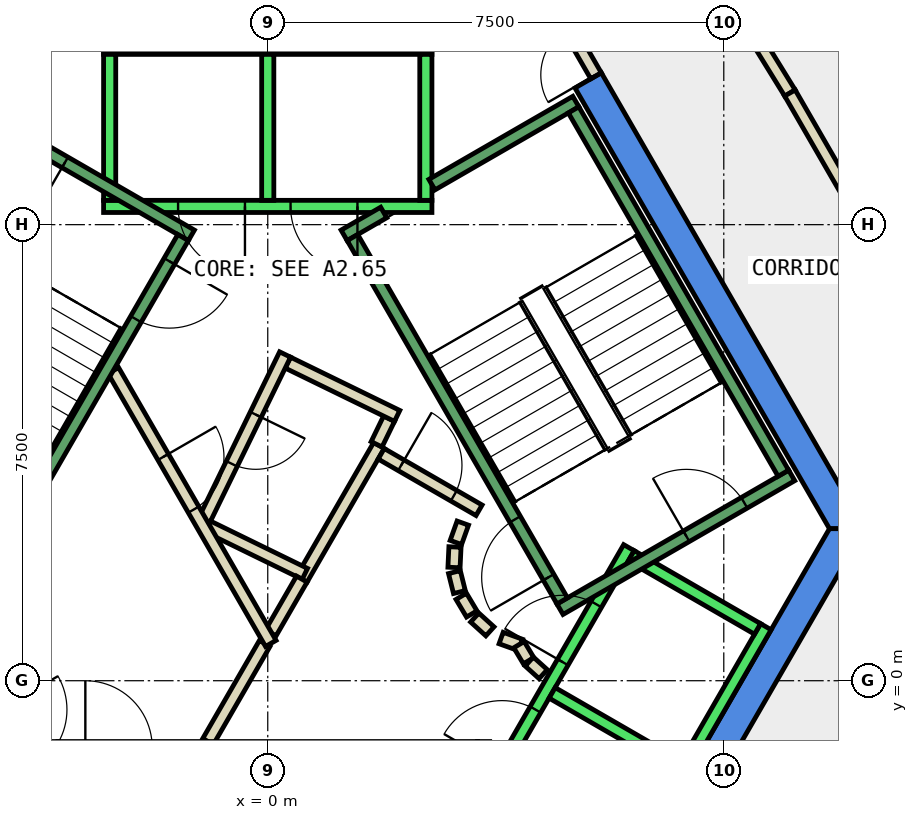
"""IFC4 building model, lengths in metres.
Left out: names, types, materials, properties, quantities, classifications, styles, units other than length and angle.
Written with IfcOpenShell. Run it as: python <this file> out.ifc"""

import sys

from ifc_helpers import new_model, si_unit, direction, frame, frame_2d, origin, place, context, subcontext, project, spatial, polyline, rectangle, outline, extrude, element, fill, save


model = new_model("IFC4")
c1 = context("Model", 3, precision=1e-05, world=origin(), true_north=direction((0.0, 1.0)))
c2 = subcontext(c1, "Body", "Model", "MODEL_VIEW")
j1 = project(units=[si_unit("LENGTHUNIT", "METRE"), si_unit("PLANEANGLEUNIT", "RADIAN")], contexts=[c1])
p1 = place(None, origin())
s1 = spatial("IfcSite", under=j1, at=p1, CompositionType="ELEMENT")
p2 = place(p1, origin())
s2 = spatial("IfcBuilding", under=s1, at=p2, CompositionType="ELEMENT")
p3 = place(p2, frame((0.0, 0.0, 308.0)))
s3 = spatial("IfcBuildingStorey", under=s2, at=p3, CompositionType="ELEMENT", Elevation=308.0)
p4 = place(p3, frame((0.0, 0.0, -0.34)))
e1 = element("IfcWall", 1, at=p4, inside=s3, PredefinedType="SHEAR", context=c2, shape_type="SweptSolid", body=[
    extrude(outline(polyline([(5.486, 9.998), (5.053, 9.748), (9.238, 2.5), (9.815, 2.5), (5.486, 9.998)])), origin(), (0.0, 0.0, 1.0), 3.6),
])
p5 = place(p3, frame((0.0, 0.0, -0.34)))
e2 = element("IfcWall", 2, at=p5, inside=s3, PredefinedType="SHEAR", context=c2, shape_type="SweptSolid", body=[
    extrude(outline(polyline([(4.907, -6.0), (9.815, 2.5), (9.238, 2.5), (4.619, -5.5), (4.907, -6.0)])), origin(), (0.0, 0.0, 1.0), 3.6),
])
p6 = place(p3, frame((0.56, 1.671, 0.0), z_axis=(0.0, 0.0, 1.0), x_axis=(0.500008334558, 0.866020591771, 0.0)))
e3 = element("IfcWall", 3, at=p6, inside=s3, PredefinedType="PARTITIONING", context=c2, shape_type="SweptSolid", body=[
    extrude(rectangle(XDim=2.538, YDim=0.2, at=frame_2d((1.269, 0.0))), origin(), (0.0, 0.0, 1.0), 3.26),
])
p7 = place(p3, frame((1.79, 3.888, 0.0), z_axis=(0.0, 0.0, 1.0), x_axis=(0.437807406823, 0.899068781869, 0.0)))
e4 = element("IfcWall", 4, at=p7, inside=s3, PredefinedType="PARTITIONING", context=c2, shape_type="SweptSolid", body=[
    extrude(rectangle(XDim=0.469, YDim=0.2, at=frame_2d((0.234, 0.0))), origin(), (0.0, 0.0, 1.0), 3.26),
])
p8 = place(p3, frame((2.128, 4.355, 0.0), z_axis=(0.0, 0.0, 1.0), x_axis=(-0.898876404494, 0.438202247191, 0.0)))
e5 = element("IfcWall", 5, at=p8, inside=s3, PredefinedType="PARTITIONING", context=c2, shape_type="SweptSolid", body=[
    extrude(rectangle(XDim=1.999, YDim=0.2, at=frame_2d((1.0, 0.0))), origin(), (0.0, 0.0, 1.0), 3.26),
])
p9 = place(p3, frame((0.285, 5.365, 0.0), z_axis=(0.0, 0.0, 1.0), x_axis=(-0.43840190643, -0.898779043168, 0.0)))
e6 = element("IfcWall", 6, at=p9, inside=s3, PredefinedType="PARTITIONING", context=c2, shape_type="SweptSolid", body=[
    extrude(rectangle(XDim=3.1, YDim=0.2, at=frame_2d((1.55, 0.0))), origin(), (0.0, 0.0, 1.0), 3.26),
])
p10 = place(p9, frame((1.1, 0.0, 0.0)))
e7 = element("IfcOpeningElement", 7, at=p10, cuts=e6, PredefinedType="OPENING", context=c2, shape_type="SweptSolid", body=[
    extrude(rectangle(XDim=0.9, YDim=2.1, at=frame_2d((0.45, 1.05))), frame((0.0, 0.11, 0.0), z_axis=(0.0, -1.0, 0.0), x_axis=(1.0, 0.0, 0.0)), (0.0, 0.0, 1.0), 0.22),
])
p11 = place(p3, frame((-0.984, 2.535, 0.0), z_axis=(0.0, 0.0, 1.0), x_axis=(0.898707583217, -0.438548378025, 0.0)))
e8 = element("IfcWall", 8, at=p11, inside=s3, PredefinedType="PARTITIONING", context=c2, shape_type="SweptSolid", body=[
    extrude(rectangle(XDim=1.774, YDim=0.2, at=frame_2d((0.887, 0.0))), origin(), (0.0, 0.0, 1.0), 3.26),
])
p12 = place(p3, frame((4.454, 16.364, 0.0), z_axis=(0.0, 0.0, 1.0), x_axis=(0.525142215688, -0.851014484778, 0.0)))
e9 = element("IfcWall", 9, at=p12, inside=s3, PredefinedType="PARTITIONING", context=c2, shape_type="SweptSolid", body=[
    extrude(rectangle(XDim=7.872, YDim=0.2, at=frame_2d((3.936, 0.0))), origin(), (0.0, 0.0, 1.0), 3.26),
])
p13 = place(p3, frame((8.588, 9.665, 0.0), z_axis=(0.0, 0.0, 1.0), x_axis=(0.499946799636, -0.86605611685, 0.0)))
e10 = element("IfcWall", 10, at=p13, inside=s3, PredefinedType="PARTITIONING", context=c2, shape_type="SweptSolid", body=[
    extrude(rectangle(XDim=8.227, YDim=0.2, at=frame_2d((4.114, 0.0))), origin(), (0.0, 0.0, 1.0), 3.26),
])
p14 = place(p13, frame((3.613, 0.0, 0.0)))
e11 = element("IfcOpeningElement", 11, at=p14, cuts=e10, PredefinedType="OPENING", context=c2, shape_type="SweptSolid", body=[
    extrude(rectangle(XDim=1.0, YDim=2.1, at=frame_2d((0.5, 1.05))), frame((0.0, 0.11, 0.0), z_axis=(0.0, -1.0, 0.0), x_axis=(1.0, 0.0, 0.0)), (0.0, 0.0, 1.0), 0.22),
])
p15 = place(p3, frame((-0.982, -1.0, 0.0), z_axis=(0.0, 0.0, 1.0), x_axis=(0.50024047865, 0.865886518847, 0.0)))
e12 = element("IfcWall", 12, at=p15, inside=s3, PredefinedType="PARTITIONING", context=c2, shape_type="SweptSolid", body=[
    extrude(rectangle(XDim=1.863, YDim=0.2, at=frame_2d((0.931, 0.0))), origin(), (0.0, 0.0, 1.0), 3.26),
])
p16 = place(p3, frame((0.05, 0.787, 0.0), z_axis=(0.0, 0.0, 1.0), x_axis=(0.499819111317, 0.866129814729, 0.0)))
e13 = element("IfcWall", 13, at=p16, inside=s3, PredefinedType="PARTITIONING", context=c2, shape_type="SweptSolid", body=[
    extrude(rectangle(XDim=1.021, YDim=0.2, at=frame_2d((0.51, 0.0))), origin(), (0.0, 0.0, 1.0), 3.26),
])
p17 = place(p3, frame((1.866, 3.732, 0.0), z_axis=(0.0, 0.0, 1.0), x_axis=(0.866043361281, -0.499968895414, 0.0)))
e14 = element("IfcWall", 14, at=p17, inside=s3, PredefinedType="PARTITIONING", context=c2, shape_type="SweptSolid", body=[
    extrude(rectangle(XDim=1.858, YDim=0.2, at=frame_2d((0.929, 0.0))), origin(), (0.0, 0.0, 1.0), 3.26),
])
p18 = place(p17, frame((0.379, 0.0, 0.0)))
e15 = element("IfcOpeningElement", 15, at=p18, cuts=e14, PredefinedType="OPENING", context=c2, shape_type="SweptSolid", body=[
    extrude(rectangle(XDim=1.0, YDim=2.1, at=frame_2d((0.5, 1.05))), frame((0.0, 0.11, 0.0), z_axis=(0.0, -1.0, 0.0), x_axis=(1.0, 0.0, 0.0)), (0.0, 0.0, 1.0), 0.22),
])
p19 = place(p3, frame((3.208, 2.592, 0.0), z_axis=(0.0, 0.0, 1.0), x_axis=(-0.337388820924, -0.941365382578, 0.0)))
e16 = element("IfcWall", 16, at=p19, inside=s3, PredefinedType="PARTITIONING", context=c2, shape_type="SweptSolid", body=[
    extrude(rectangle(XDim=0.338, YDim=0.2, at=frame_2d((0.169, 0.0))), origin(), (0.0, 0.0, 1.0), 3.26),
])
p20 = place(p3, frame((3.079, 2.199, 0.0), z_axis=(0.0, 0.0, 1.0), x_axis=(-0.047771483479, -0.998858290933, 0.0)))
e17 = element("IfcWall", 17, at=p20, inside=s3, PredefinedType="PARTITIONING", context=c2, shape_type="SweptSolid", body=[
    extrude(rectangle(XDim=0.337, YDim=0.2, at=frame_2d((0.169, 0.0))), origin(), (0.0, 0.0, 1.0), 3.26),
])
p21 = place(p3, frame((3.07, 1.786, 0.0), z_axis=(0.0, 0.0, 1.0), x_axis=(0.242705583207, -0.970099994784, 0.0)))
e18 = element("IfcWall", 18, at=p21, inside=s3, PredefinedType="PARTITIONING", context=c2, shape_type="SweptSolid", body=[
    extrude(rectangle(XDim=0.338, YDim=0.2, at=frame_2d((0.169, 0.0))), origin(), (0.0, 0.0, 1.0), 3.26),
])
for number, where, z_axis, x_axis in (
    (19, (3.182, 1.388, 0.0), (0.0, 0.0, 1.0), (0.512, -0.859, 0.0)),
    (20, (3.404, 1.039, 0.0), (0.0, 0.0, 1.0), (0.74, -0.672, 0.0)),
):
    element("IfcWall", number, at=place(p3, frame(where, z_axis=z_axis, x_axis=x_axis)), inside=s3, PredefinedType="PARTITIONING", context=c2, shape_type="SweptSolid", body=[
        extrude(rectangle(XDim=0.338, YDim=0.2, at=frame_2d((0.169, 0.0))), origin(), (0.0, 0.0, 1.0), 3.26),
    ])
p22 = place(p3, frame((3.838, 0.702, 0.0), z_axis=(0.0, 0.0, 1.0), x_axis=(0.941035081519, -0.338308993895, 0.0)))
e21 = element("IfcWall", 21, at=p22, inside=s3, PredefinedType="PARTITIONING", context=c2, shape_type="SweptSolid", body=[
    extrude(rectangle(XDim=0.337, YDim=0.2, at=frame_2d((0.168, 0.0))), origin(), (0.0, 0.0, 1.0), 3.26),
])
p23 = place(p3, frame((4.132, 0.593, 0.0), z_axis=(0.0, 0.0, 1.0), x_axis=(0.513561617048, -0.858052717201, 0.0)))
e22 = element("IfcWall", 22, at=p23, inside=s3, PredefinedType="PARTITIONING", context=c2, shape_type="SweptSolid", body=[
    extrude(rectangle(XDim=0.308, YDim=0.2, at=frame_2d((0.154, 0.0))), origin(), (0.0, 0.0, 1.0), 3.26),
])
p24 = place(p3, frame((4.301, 0.315, 0.0), z_axis=(0.0, 0.0, 1.0), x_axis=(0.741798017506, -0.670623367639, 0.0)))
e23 = element("IfcWall", 23, at=p24, inside=s3, PredefinedType="PARTITIONING", context=c2, shape_type="SweptSolid", body=[
    extrude(rectangle(XDim=0.309, YDim=0.2, at=frame_2d((0.154, 0.0))), origin(), (0.0, 0.0, 1.0), 3.26),
])
p25 = place(p3, frame((-2.54, 5.1, 0.0), z_axis=(0.0, 0.0, 1.0), x_axis=(0.499925051871, -0.866068670783, 0.0)))
e24 = element("IfcWall", 24, at=p25, inside=s3, PredefinedType="PARTITIONING", context=c2, shape_type="SweptSolid", body=[
    extrude(rectangle(XDim=5.181, YDim=0.2, at=frame_2d((2.59, 0.0))), origin(), (0.0, 0.0, 1.0), 3.26),
])
p26 = place(p25, frame((1.64, 0.0, 0.0)))
e25 = element("IfcOpeningElement", 25, at=p26, cuts=e24, PredefinedType="OPENING", context=c2, shape_type="SweptSolid", body=[
    extrude(rectangle(XDim=1.0, YDim=2.1, at=frame_2d((0.5, 1.05))), frame((0.0, 0.11, 0.0), z_axis=(0.0, -1.0, 0.0), x_axis=(1.0, 0.0, 0.0)), (0.0, 0.0, 1.0), 0.22),
])
p27 = place(p3, frame((5.399, 9.948, 0.0), z_axis=(0.0, 0.0, 1.0), x_axis=(-0.499882215713, 0.866093395895, 0.0)))
e26 = element("IfcWall", 26, at=p27, inside=s3, PredefinedType="PARTITIONING", context=c2, shape_type="SweptSolid", body=[
    extrude(rectangle(XDim=0.926, YDim=0.2, at=frame_2d((0.463, 0.0))), origin(), (0.0, 0.0, 1.0), 2.4),
])
p28 = place(p27, frame((0.017, 0.0, 0.0)))
e27 = element("IfcOpeningElement", 27, at=p28, cuts=e26, PredefinedType="OPENING", context=c2, shape_type="SweptSolid", body=[
    extrude(rectangle(XDim=0.9, YDim=2.1, at=frame_2d((0.45, 1.05))), frame((0.0, 0.11, 0.0), z_axis=(0.0, -1.0, 0.0), x_axis=(1.0, 0.0, 0.0)), (0.0, 0.0, 1.0), 0.22),
])
p29 = place(p3, frame((2.7, 7.8, 0.0), z_axis=(0.0, 0.0, 1.0), x_axis=(-1.0, 0.0, 0.0)))
e28 = element("IfcWall", 28, at=p29, inside=s3, PredefinedType="STANDARD", context=c2, shape_type="SweptSolid", body=[
    extrude(rectangle(XDim=5.4, YDim=0.2, at=frame_2d((2.7, 0.0))), origin(), (0.0, 0.0, 1.0), 3.26),
])
p30 = place(p29, frame((1.225, 0.0, 0.0)))
e29 = element("IfcOpeningElement", 29, at=p30, cuts=e28, PredefinedType="OPENING", context=c2, shape_type="SweptSolid", body=[
    extrude(rectangle(XDim=1.1, YDim=2.1, at=frame_2d((0.55, 1.05))), frame((0.0, 0.11, 0.0), z_axis=(0.0, -1.0, 0.0), x_axis=(1.0, 0.0, 0.0)), (0.0, 0.0, 1.0), 0.22),
])
p31 = place(p29, frame((3.075, 0.0, 0.0)))
e30 = element("IfcOpeningElement", 30, at=p31, cuts=e28, PredefinedType="OPENING", context=c2, shape_type="SweptSolid", body=[
    extrude(rectangle(XDim=1.1, YDim=2.1, at=frame_2d((0.55, 1.05))), frame((0.0, 0.11, 0.0), z_axis=(0.0, -1.0, 0.0), x_axis=(1.0, 0.0, 0.0)), (0.0, 0.0, 1.0), 0.22),
])
p32 = place(p3, frame((2.7, 10.4, 0.0), z_axis=(0.0, 0.0, 1.0), x_axis=(-1.0, 0.0, 0.0)))
e31 = element("IfcWall", 31, at=p32, inside=s3, PredefinedType="STANDARD", context=c2, shape_type="SweptSolid", body=[
    extrude(rectangle(XDim=5.4, YDim=0.2, at=frame_2d((2.7, 0.0))), origin(), (0.0, 0.0, 1.0), 3.26),
])
for number, where, z_axis, x_axis in (
    (32, (2.6, 7.9, 0.0), (0.0, 0.0, 1.0), (0.0, 1.0, 0.0)),
    (33, (0.0, 7.9, 0.0), (0.0, 0.0, 1.0), (0.0, 1.0, 0.0)),
    (34, (-2.6, 7.9, 0.0), (0.0, 0.0, 1.0), (0.0, 1.0, 0.0)),
):
    element("IfcWall", number, at=place(p3, frame(where, z_axis=z_axis, x_axis=x_axis)), inside=s3, PredefinedType="STANDARD", context=c2, shape_type="SweptSolid", body=[
        extrude(rectangle(XDim=2.4, YDim=0.2, at=frame_2d((1.2, 0.0))), origin(), (0.0, 0.0, 1.0), 3.26),
    ])
p33 = place(p3, frame((-5.94, 2.188, 0.0), z_axis=(0.0, 0.0, 1.0), x_axis=(0.500034260056, -0.866005622828, 0.0)))
e35 = element("IfcWall", 35, at=p33, inside=s3, PredefinedType="STANDARD", context=c2, shape_type="SweptSolid", body=[
    extrude(rectangle(XDim=5.399, YDim=0.2, at=frame_2d((2.7, 0.0))), origin(), (0.0, 0.0, 1.0), 3.26),
])
p34 = place(p33, frame((3.075, 0.0, 0.0)))
e36 = element("IfcOpeningElement", 36, at=p34, cuts=e35, PredefinedType="OPENING", context=c2, shape_type="SweptSolid", body=[
    extrude(rectangle(XDim=1.1, YDim=2.1, at=frame_2d((0.55, 1.05))), frame((0.0, 0.11, 0.0), z_axis=(0.0, -1.0, 0.0), x_axis=(1.0, 0.0, 0.0)), (0.0, 0.0, 1.0), 0.22),
])
p35 = place(p33, frame((1.225, 0.0, 0.0)))
e37 = element("IfcOpeningElement", 37, at=p35, cuts=e35, PredefinedType="OPENING", context=c2, shape_type="SweptSolid", body=[
    extrude(rectangle(XDim=1.1, YDim=2.1, at=frame_2d((0.55, 1.05))), frame((0.0, 0.11, 0.0), z_axis=(0.0, -1.0, 0.0), x_axis=(1.0, 0.0, 0.0)), (0.0, 0.0, 1.0), 0.22),
])
p36 = place(p3, frame((3.24, -2.488, 0.0), z_axis=(0.0, 0.0, 1.0), x_axis=(0.500034260056, 0.866005622828, 0.0)))
e38 = element("IfcWall", 38, at=p36, inside=s3, PredefinedType="STANDARD", context=c2, shape_type="SweptSolid", body=[
    extrude(rectangle(XDim=5.399, YDim=0.2, at=frame_2d((2.7, 0.0))), origin(), (0.0, 0.0, 1.0), 3.26),
])
p37 = place(p36, frame((3.225, 0.0, 0.0)))
e39 = element("IfcOpeningElement", 39, at=p37, cuts=e38, PredefinedType="OPENING", context=c2, shape_type="SweptSolid", body=[
    extrude(rectangle(XDim=1.1, YDim=2.1, at=frame_2d((0.55, 1.05))), frame((0.0, 0.11, 0.0), z_axis=(0.0, -1.0, 0.0), x_axis=(1.0, 0.0, 0.0)), (0.0, 0.0, 1.0), 0.22),
])
p38 = place(p36, frame((1.225, 0.0, 0.0)))
e40 = element("IfcOpeningElement", 40, at=p38, cuts=e38, PredefinedType="OPENING", context=c2, shape_type="SweptSolid", body=[
    extrude(rectangle(XDim=1.1, YDim=2.1, at=frame_2d((0.55, 1.05))), frame((0.0, 0.11, 0.0), z_axis=(0.0, -1.0, 0.0), x_axis=(1.0, 0.0, 0.0)), (0.0, 0.0, 1.0), 0.22),
])
p39 = place(p3, frame((5.492, -3.788, 0.0), z_axis=(0.0, 0.0, 1.0), x_axis=(0.500034260056, 0.866005622828, 0.0)))
e41 = element("IfcWall", 41, at=p39, inside=s3, PredefinedType="STANDARD", context=c2, shape_type="SweptSolid", body=[
    extrude(rectangle(XDim=5.399, YDim=0.2, at=frame_2d((2.7, 0.0))), origin(), (0.0, 0.0, 1.0), 3.26),
])
for number, where, z_axis, x_axis in (
    (42, (4.677, -0.2, 0.0), (0.0, 0.0, 1.0), (0.866, -0.5, 0.0)),
    (43, (5.977, 2.052, 0.0), (0.0, 0.0, 1.0), (0.866, -0.5, 0.0)),
):
    element("IfcWall", number, at=place(p3, frame(where, z_axis=z_axis, x_axis=x_axis)), inside=s3, PredefinedType="STANDARD", context=c2, shape_type="SweptSolid", body=[
        extrude(rectangle(XDim=2.399, YDim=0.2, at=frame_2d((1.2, 0.0))), origin(), (0.0, 0.0, 1.0), 3.26),
    ])
p40 = place(p3, frame((4.806, 1.176, 0.0), z_axis=(0.0, 0.0, 1.0), x_axis=(0.866059941101, 0.499940174841, 0.0)))
e44 = element("IfcWall", 44, at=p40, inside=s3, PredefinedType="STANDARD", context=c2, shape_type="SweptSolid", body=[
    extrude(rectangle(XDim=4.4, YDim=0.2, at=frame_2d((2.2, 0.0))), origin(), (0.0, 0.0, 1.0), 3.26),
])
p41 = place(p40, frame((2.4, 0.0, 0.0)))
e45 = element("IfcOpeningElement", 45, at=p41, cuts=e44, PredefinedType="OPENING", context=c2, shape_type="SweptSolid", body=[
    extrude(rectangle(XDim=1.1, YDim=2.2, at=frame_2d((0.55, 1.1))), frame((0.0, 0.11, 0.0), z_axis=(0.0, -1.0, 0.0), x_axis=(1.0, 0.0, 0.0)), (0.0, 0.0, 1.0), 0.22),
])
p42 = place(p3, frame((2.7, 8.158, 0.0), z_axis=(0.0, 0.0, 1.0), x_axis=(0.86611865017, 0.499838457731, 0.0)))
e46 = element("IfcWall", 46, at=p42, inside=s3, PredefinedType="STANDARD", context=c2, shape_type="SweptSolid", body=[
    extrude(rectangle(XDim=2.733, YDim=0.2, at=frame_2d((1.366, 0.0))), origin(), (0.0, 0.0, 1.0), 3.26),
])
p43 = place(p3, frame((1.256, 7.324, 0.0), z_axis=(0.0, 0.0, 1.0), x_axis=(0.865915093549, 0.500191014278, 0.0)))
e47 = element("IfcWall", 47, at=p43, inside=s3, PredefinedType="STANDARD", context=c2, shape_type="SweptSolid", body=[
    extrude(rectangle(XDim=0.752, YDim=0.2, at=frame_2d((0.376, 0.0))), origin(), (0.0, 0.0, 1.0), 3.26),
])
p44 = place(p3, frame((4.843, 1.312, 0.0), z_axis=(0.0, 0.0, 1.0), x_axis=(-0.499963383562, 0.866046543262, 0.0)))
e48 = element("IfcWall", 48, at=p44, inside=s3, PredefinedType="STANDARD", context=c2, shape_type="SweptSolid", body=[
    extrude(rectangle(XDim=6.9, YDim=0.2, at=frame_2d((3.45, 0.0))), origin(), (0.0, 0.0, 1.0), 3.26),
])
p45 = place(p44, frame((0.45, 0.0, 0.0)))
e49 = element("IfcOpeningElement", 49, at=p45, cuts=e48, PredefinedType="OPENING", context=c2, shape_type="SweptSolid", body=[
    extrude(rectangle(XDim=1.1, YDim=2.2, at=frame_2d((0.55, 1.1))), frame((0.0, 0.11, 0.0), z_axis=(0.0, -1.0, 0.0), x_axis=(1.0, 0.0, 0.0)), (0.0, 0.0, 1.0), 0.22),
])
p46 = place(p3, frame((8.48, 3.412, 0.0), z_axis=(0.0, 0.0, 1.0), x_axis=(-0.499978703459, 0.866037698999, 0.0)))
e50 = element("IfcWall", 50, at=p46, inside=s3, PredefinedType="STANDARD", context=c2, shape_type="SweptSolid", body=[
    extrude(rectangle(XDim=6.9, YDim=0.2, at=frame_2d((3.45, 0.0))), origin(), (0.0, 0.0, 1.0), 3.26),
])
p47 = place(p3, frame((-1.256, 7.324, 0.0), z_axis=(0.0, 0.0, 1.0), x_axis=(-0.866046073146, 0.499964197906, 0.0)))
e51 = element("IfcWall", 51, at=p47, inside=s3, PredefinedType="STANDARD", context=c2, shape_type="SweptSolid", body=[
    extrude(rectangle(XDim=4.4, YDim=0.2, at=frame_2d((2.2, 0.0))), origin(), (0.0, 0.0, 1.0), 3.26),
])
p48 = place(p47, frame((2.4, 0.0, 0.0)))
e52 = element("IfcOpeningElement", 52, at=p48, cuts=e51, PredefinedType="OPENING", context=c2, shape_type="SweptSolid", body=[
    extrude(rectangle(XDim=1.1, YDim=2.2, at=frame_2d((0.55, 1.1))), frame((0.0, 0.11, 0.0), z_axis=(0.0, -1.0, 0.0), x_axis=(1.0, 0.0, 0.0)), (0.0, 0.0, 1.0), 0.22),
])
p49 = place(p3, frame((-1.393, 7.288, 0.0), z_axis=(0.0, 0.0, 1.0), x_axis=(-0.499963383562, -0.866046543262, 0.0)))
e53 = element("IfcWall", 53, at=p49, inside=s3, PredefinedType="STANDARD", context=c2, shape_type="SweptSolid", body=[
    extrude(rectangle(XDim=6.9, YDim=0.2, at=frame_2d((3.45, 0.0))), origin(), (0.0, 0.0, 1.0), 3.26),
])
p50 = place(p49, frame((0.45, 0.0, 0.0)))
e54 = element("IfcOpeningElement", 54, at=p50, cuts=e53, PredefinedType="OPENING", context=c2, shape_type="SweptSolid", body=[
    extrude(rectangle(XDim=1.1, YDim=2.2, at=frame_2d((0.55, 1.1))), frame((0.0, 0.11, 0.0), z_axis=(0.0, -1.0, 0.0), x_axis=(1.0, 0.0, 0.0)), (0.0, 0.0, 1.0), 0.22),
])
p51 = place(p18, origin())
e55 = element("IfcDoor", 55, at=p51, inside=s3, OperationType="SINGLE_SWING_LEFT", PredefinedType="DOOR", context=c2, shape_type="SweptSolid", body=[
    extrude(rectangle(XDim=1.0, YDim=2.1, at=frame_2d((0.5, 1.05))), frame((0.0, 0.025, 0.0), z_axis=(0.0, -1.0, 0.0), x_axis=(1.0, 0.0, 0.0)), (0.0, 0.0, 1.0), 0.05),
])
fill(e15, e55)
p52 = place(p26, origin())
e56 = element("IfcDoor", 56, at=p52, inside=s3, OperationType="SINGLE_SWING_RIGHT", PredefinedType="DOOR", context=c2, shape_type="SweptSolid", body=[
    extrude(rectangle(XDim=1.0, YDim=2.1, at=frame_2d((0.5, 1.05))), frame((0.0, 0.025, 0.0), z_axis=(0.0, -1.0, 0.0), x_axis=(1.0, 0.0, 0.0)), (0.0, 0.0, 1.0), 0.05),
])
fill(e25, e56)
p53 = place(p10, origin())
e57 = element("IfcDoor", 57, at=p53, inside=s3, OperationType="SINGLE_SWING_RIGHT", PredefinedType="DOOR", context=c2, shape_type="SweptSolid", body=[
    extrude(rectangle(XDim=0.9, YDim=2.1, at=frame_2d((0.45, 1.05))), frame((0.0, 0.025, 0.0), z_axis=(0.0, -1.0, 0.0), x_axis=(1.0, 0.0, 0.0)), (0.0, 0.0, 1.0), 0.05),
])
fill(e7, e57)
p54 = place(p28, origin())
e58 = element("IfcDoor", 58, at=p54, inside=s3, OperationType="SINGLE_SWING_LEFT", PredefinedType="DOOR", context=c2, shape_type="SweptSolid", body=[
    extrude(rectangle(XDim=0.9, YDim=2.1, at=frame_2d((0.45, 1.05))), frame((0.0, 0.025, 0.0), z_axis=(0.0, -1.0, 0.0), x_axis=(1.0, 0.0, 0.0)), (0.0, 0.0, 1.0), 0.05),
])
fill(e27, e58)
p55 = place(p30, origin())
e59 = element("IfcDoor", 59, at=p55, inside=s3, OperationType="SLIDING_TO_LEFT", PredefinedType="DOOR", context=c2, shape_type="SweptSolid", body=[
    extrude(rectangle(XDim=1.1, YDim=2.1, at=frame_2d((0.55, 1.05))), frame((0.0, 0.025, 0.0), z_axis=(0.0, -1.0, 0.0), x_axis=(1.0, 0.0, 0.0)), (0.0, 0.0, 1.0), 0.05),
])
fill(e29, e59)
p56 = place(p31, origin())
e60 = element("IfcDoor", 60, at=p56, inside=s3, OperationType="SLIDING_TO_LEFT", PredefinedType="DOOR", context=c2, shape_type="SweptSolid", body=[
    extrude(rectangle(XDim=1.1, YDim=2.1, at=frame_2d((0.55, 1.05))), frame((0.0, 0.025, 0.0), z_axis=(0.0, -1.0, 0.0), x_axis=(1.0, 0.0, 0.0)), (0.0, 0.0, 1.0), 0.05),
])
fill(e30, e60)
p57 = place(p37, origin())
e61 = element("IfcDoor", 61, at=p57, inside=s3, OperationType="SLIDING_TO_LEFT", PredefinedType="DOOR", context=c2, shape_type="SweptSolid", body=[
    extrude(rectangle(XDim=1.1, YDim=2.1, at=frame_2d((0.55, 1.05))), frame((0.0, 0.025, 0.0), z_axis=(0.0, -1.0, 0.0), x_axis=(1.0, 0.0, 0.0)), (0.0, 0.0, 1.0), 0.05),
])
fill(e39, e61)
p58 = place(p38, origin())
e62 = element("IfcDoor", 62, at=p58, inside=s3, OperationType="SLIDING_TO_LEFT", PredefinedType="DOOR", context=c2, shape_type="SweptSolid", body=[
    extrude(rectangle(XDim=1.1, YDim=2.1, at=frame_2d((0.55, 1.05))), frame((0.0, 0.025, 0.0), z_axis=(0.0, -1.0, 0.0), x_axis=(1.0, 0.0, 0.0)), (0.0, 0.0, 1.0), 0.05),
])
fill(e40, e62)
p59 = place(p45, origin())
e63 = element("IfcDoor", 63, at=p59, inside=s3, OperationType="SINGLE_SWING_LEFT", PredefinedType="DOOR", context=c2, shape_type="SweptSolid", body=[
    extrude(rectangle(XDim=1.1, YDim=2.2, at=frame_2d((0.55, 1.1))), frame((0.0, 0.025, 0.0), z_axis=(0.0, -1.0, 0.0), x_axis=(1.0, 0.0, 0.0)), (0.0, 0.0, 1.0), 0.05),
])
fill(e49, e63)
p60 = place(p41, origin())
e64 = element("IfcDoor", 64, at=p60, inside=s3, OperationType="SINGLE_SWING_LEFT", PredefinedType="DOOR", context=c2, shape_type="SweptSolid", body=[
    extrude(rectangle(XDim=1.1, YDim=2.2, at=frame_2d((0.55, 1.1))), frame((0.0, 0.025, 0.0), z_axis=(0.0, -1.0, 0.0), x_axis=(1.0, 0.0, 0.0)), (0.0, 0.0, 1.0), 0.05),
])
fill(e45, e64)
p61 = place(p50, origin())
e65 = element("IfcDoor", 65, at=p61, inside=s3, OperationType="SINGLE_SWING_LEFT", PredefinedType="DOOR", context=c2, shape_type="SweptSolid", body=[
    extrude(rectangle(XDim=1.1, YDim=2.2, at=frame_2d((0.55, 1.1))), frame((0.0, 0.025, 0.0), z_axis=(0.0, -1.0, 0.0), x_axis=(1.0, 0.0, 0.0)), (0.0, 0.0, 1.0), 0.05),
])
fill(e54, e65)
p62 = place(p48, origin())
e66 = element("IfcDoor", 66, at=p62, inside=s3, OperationType="SINGLE_SWING_LEFT", PredefinedType="DOOR", context=c2, shape_type="SweptSolid", body=[
    extrude(rectangle(XDim=1.1, YDim=2.2, at=frame_2d((0.55, 1.1))), frame((0.0, 0.025, 0.0), z_axis=(0.0, -1.0, 0.0), x_axis=(1.0, 0.0, 0.0)), (0.0, 0.0, 1.0), 0.05),
])
fill(e52, e66)
save(model, sys.argv[1])
